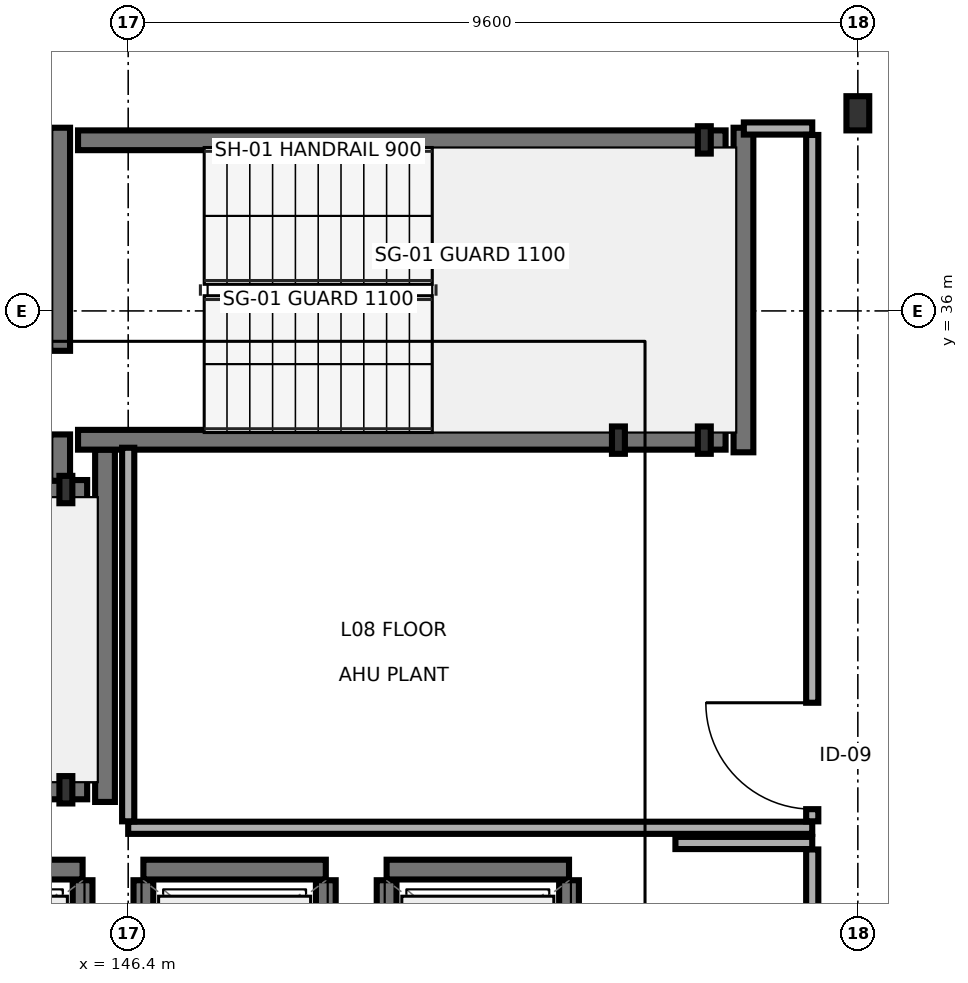
"""IFC4 building model, lengths in metres.
Left out: names, types, materials, properties, quantities, classifications, styles, units other than length and angle.
Written with IfcOpenShell. Run it as: python <this file> out.ifc"""

import sys

from ifc_helpers import new_model, si_unit, direction, frame, frame_2d, origin, origin_2d, place, context, subcontext, project, spatial, rectangle, i_section, extrude, element, fill, save


model = new_model("IFC4")
c1 = context("Model", 3, precision=1e-05, world=origin(), true_north=direction((0.0, 1.0)))
c2 = subcontext(c1, "Body", "Model", "MODEL_VIEW")
j1 = project(units=[si_unit("LENGTHUNIT", "METRE"), si_unit("PLANEANGLEUNIT", "RADIAN")], contexts=[c1])
p1 = place(None, origin())
s1 = spatial("IfcSite", under=j1, at=p1, CompositionType="ELEMENT")
p2 = place(p1, origin())
s2 = spatial("IfcBuilding", under=s1, at=p2, CompositionType="ELEMENT")
p3 = place(p2, frame((0.0, 0.0, 28.3)))
s3 = spatial("IfcBuildingStorey", under=s2, at=p3, CompositionType="ELEMENT", Elevation=28.3)
for number, where, z_axis, x_axis in (
    (1, (145.58, 29.7, 0.0), (0.0, 0.0, 1.0), (1.0, 0.0, 0.0)),
    (2, (145.58, 33.65, 0.0), (0.0, 0.0, 1.0), (1.0, 0.0, 0.0)),
    (3, (152.85, 34.3, 0.0), (0.0, 0.0, 1.0), (1.0, 0.0, 0.0)),
    (4, (153.98, 34.3, 0.0), (0.0, 0.0, 1.0), (1.0, 0.0, 0.0)),
    (5, (153.98, 38.25, 0.0), (0.0, 0.0, 1.0), (1.0, 0.0, 0.0)),
):
    element("IfcColumn", number, at=place(p3, frame(where, z_axis=z_axis, x_axis=x_axis)), inside=s3, PredefinedType="PILASTER", context=c2, shape_type="SweptSolid", body=[
        extrude(i_section(OverallWidth=0.17, OverallDepth=0.36, WebThickness=0.008, FlangeThickness=0.013, FilletRadius=0.018, at=origin_2d()), origin(), (0.0, 0.0, 1.0), 3.4),
    ])
p4 = place(p3, frame((156.0, 38.6, 0.0), z_axis=(0.0, 0.0, 1.0), x_axis=(1.0, 0.0, 0.0)))
e6 = element("IfcColumn", 6, at=p4, inside=s3, PredefinedType="COLUMN", context=c2, shape_type="SweptSolid", body=[
    extrude(i_section(OverallWidth=0.3, OverallDepth=0.45, WebThickness=0.014, FlangeThickness=0.026, FilletRadius=0.027, at=origin_2d()), origin(), (0.0, 0.0, 1.0), 3.4),
])
p5 = place(p3, frame((146.095, 29.54, 0.0), z_axis=(0.0, 0.0, 1.0), x_axis=(0.0, 1.0, 0.0)))
e7 = element("IfcWall", 7, at=p5, inside=s3, PredefinedType="SHEAR", context=c2, shape_type="SweptSolid", body=[
    extrude(rectangle(XDim=4.635, YDim=0.26, at=frame_2d((2.317, 0.0))), origin(), (0.0, 0.0, 1.0), 3.175),
])
for number, where, z_axis, x_axis in (
    (8, (137.34, 29.705, 0.0), (0.0, 0.0, 1.0), (1.0, 0.0, 0.0)),
    (9, (137.34, 33.645, 0.0), (0.0, 0.0, 1.0), (1.0, 0.0, 0.0)),
):
    element("IfcWall", number, at=place(p3, frame(where, z_axis=z_axis, x_axis=x_axis)), inside=s3, PredefinedType="SHEAR", context=c2, shape_type="SweptSolid", body=[
        extrude(rectangle(XDim=8.52, YDim=0.26, at=frame_2d((4.26, 0.0))), origin(), (0.0, 0.0, 1.0), 3.175),
    ])
p6 = place(p3, frame((145.505, 33.765, 0.0), z_axis=(0.0, 0.0, 1.0), x_axis=(0.0, 1.0, 0.0)))
e10 = element("IfcWall", 10, at=p6, inside=s3, PredefinedType="SHEAR", context=c2, shape_type="SweptSolid", body=[
    extrude(rectangle(XDim=4.645, YDim=0.26, at=frame_2d((2.323, 0.0))), origin(), (0.0, 0.0, 1.0), 3.175),
])
p7 = place(p6, frame((0.61, 0.0, 0.0)))
e11 = element("IfcOpeningElement", 11, at=p7, cuts=e10, PredefinedType="OPENING", context=c2, shape_type="SweptSolid", body=[
    extrude(rectangle(XDim=1.1, YDim=2.2, at=frame_2d((0.55, 1.1))), frame((0.0, 0.14, 0.0), z_axis=(0.0, -1.0, 0.0), x_axis=(1.0, 0.0, 0.0)), (0.0, 0.0, 1.0), 0.28),
])
p8 = place(p3, frame((154.495, 34.14, 0.0), z_axis=(0.0, 0.0, 1.0), x_axis=(0.0, 1.0, 0.0)))
e12 = element("IfcWall", 12, at=p8, inside=s3, PredefinedType="SHEAR", context=c2, shape_type="SweptSolid", body=[
    extrude(rectangle(XDim=4.27, YDim=0.26, at=frame_2d((2.135, 0.0))), origin(), (0.0, 0.0, 1.0), 3.175),
])
for number, where, z_axis, x_axis in (
    (13, (145.74, 34.305, 0.0), (0.0, 0.0, 1.0), (1.0, 0.0, 0.0)),
    (14, (145.74, 38.245, 0.0), (0.0, 0.0, 1.0), (1.0, 0.0, 0.0)),
):
    element("IfcWall", number, at=place(p3, frame(where, z_axis=z_axis, x_axis=x_axis)), inside=s3, PredefinedType="SHEAR", context=c2, shape_type="SweptSolid", body=[
        extrude(rectangle(XDim=8.52, YDim=0.26, at=frame_2d((4.26, 0.0))), origin(), (0.0, 0.0, 1.0), 3.175),
    ])
p9 = place(p3, frame((143.4, 28.65, 0.0), z_axis=(0.0, 0.0, 1.0), x_axis=(1.0, 0.0, 0.0)))
e15 = element("IfcWall", 15, at=p9, inside=s3, PredefinedType="SHEAR", context=c2, shape_type="SweptSolid", body=[
    extrude(rectangle(XDim=2.4, YDim=0.26, at=frame_2d((1.2, 0.0))), origin(), (0.0, 0.0, 1.0), 3.175),
])
p10 = place(p3, frame((145.8, 26.69, 0.0), z_axis=(0.0, 0.0, 1.0), x_axis=(0.0, 1.0, 0.0)))
e16 = element("IfcWall", 16, at=p10, inside=s3, PredefinedType="SHEAR", context=c2, shape_type="SweptSolid", body=[
    extrude(rectangle(XDim=1.82, YDim=0.26, at=frame_2d((0.91, 0.0))), origin(), (0.0, 0.0, 1.0), 3.175),
])
p11 = place(p3, frame((146.6, 28.65, 0.0), z_axis=(0.0, 0.0, 1.0), x_axis=(1.0, 0.0, 0.0)))
e17 = element("IfcWall", 17, at=p11, inside=s3, PredefinedType="SHEAR", context=c2, shape_type="SweptSolid", body=[
    extrude(rectangle(XDim=2.4, YDim=0.26, at=frame_2d((1.2, 0.0))), origin(), (0.0, 0.0, 1.0), 3.175),
])
for number, where, z_axis, x_axis in (
    (18, (146.6, 26.69, 0.0), (0.0, 0.0, 1.0), (0.0, 1.0, 0.0)),
    (19, (149.0, 26.69, 0.0), (0.0, 0.0, 1.0), (0.0, 1.0, 0.0)),
):
    element("IfcWall", number, at=place(p3, frame(where, z_axis=z_axis, x_axis=x_axis)), inside=s3, PredefinedType="SHEAR", context=c2, shape_type="SweptSolid", body=[
        extrude(rectangle(XDim=1.82, YDim=0.26, at=frame_2d((0.91, 0.0))), origin(), (0.0, 0.0, 1.0), 3.175),
    ])
p12 = place(p3, frame((149.8, 28.65, 0.0), z_axis=(0.0, 0.0, 1.0), x_axis=(1.0, 0.0, 0.0)))
e20 = element("IfcWall", 20, at=p12, inside=s3, PredefinedType="SHEAR", context=c2, shape_type="SweptSolid", body=[
    extrude(rectangle(XDim=2.4, YDim=0.26, at=frame_2d((1.2, 0.0))), origin(), (0.0, 0.0, 1.0), 3.175),
])
for number, where, z_axis, x_axis in (
    (21, (149.8, 26.69, 0.0), (0.0, 0.0, 1.0), (0.0, 1.0, 0.0)),
    (22, (152.2, 26.69, 0.0), (0.0, 0.0, 1.0), (0.0, 1.0, 0.0)),
):
    element("IfcWall", number, at=place(p3, frame(where, z_axis=z_axis, x_axis=x_axis)), inside=s3, PredefinedType="SHEAR", context=c2, shape_type="SweptSolid", body=[
        extrude(rectangle(XDim=1.82, YDim=0.26, at=frame_2d((0.91, 0.0))), origin(), (0.0, 0.0, 1.0), 3.175),
    ])
p13 = place(p3, frame((146.4, 29.2, 0.0), z_axis=(0.0, 0.0, 1.0), x_axis=(1.0, 0.0, 0.0)))
e23 = element("IfcWall", 23, at=p13, inside=s3, PredefinedType="PARTITIONING", context=c2, shape_type="SweptSolid", body=[
    extrude(rectangle(XDim=9.0, YDim=0.16, at=frame_2d((4.5, 0.0))), origin(), (0.0, 0.0, 1.0), 3.175),
])
p14 = place(p3, frame((146.4, 29.285, 0.0), z_axis=(0.0, 0.0, 1.0), x_axis=(0.0, 1.0, 0.0)))
e24 = element("IfcWall", 24, at=p14, inside=s3, PredefinedType="PARTITIONING", context=c2, shape_type="SweptSolid", body=[
    extrude(rectangle(XDim=4.915, YDim=0.16, at=frame_2d((2.458, 0.0))), origin(), (0.0, 0.0, 1.0), 3.175),
])
p15 = place(p3, frame((154.5, 38.4, 0.0), z_axis=(0.0, 0.0, 1.0), x_axis=(1.0, 0.0, 0.0)))
e25 = element("IfcWall", 25, at=p15, inside=s3, PredefinedType="PARTITIONING", context=c2, shape_type="SweptSolid", body=[
    extrude(rectangle(XDim=0.9, YDim=0.16, at=frame_2d((0.45, 0.0))), origin(), (0.0, 0.0, 1.0), 2.71),
])
p16 = place(p3, frame((155.4, 29.285, 0.0), z_axis=(0.0, 0.0, 1.0), x_axis=(0.0, 1.0, 0.0)))
e26 = element("IfcWall", 26, at=p16, inside=s3, PredefinedType="PARTITIONING", context=c2, shape_type="SweptSolid", body=[
    extrude(rectangle(XDim=9.03, YDim=0.16, at=frame_2d((4.515, 0.0))), origin(), (0.0, 0.0, 1.0), 3.175),
])
p17 = place(p16, frame((0.16, 0.0, 0.0)))
e27 = element("IfcOpeningElement", 27, at=p17, cuts=e26, PredefinedType="OPENING", context=c2, shape_type="SweptSolid", body=[
    extrude(rectangle(XDim=1.4, YDim=2.2, at=frame_2d((0.7, 1.1))), frame((0.0, 0.09, 0.0), z_axis=(0.0, -1.0, 0.0), x_axis=(1.0, 0.0, 0.0)), (0.0, 0.0, 1.0), 0.18),
])
p18 = place(p3, frame((153.6, 29.0, 0.0), z_axis=(0.0, 0.0, 1.0), x_axis=(1.0, 0.0, 0.0)))
e28 = element("IfcWall", 28, at=p18, inside=s3, PredefinedType="PARTITIONING", context=c2, shape_type="SweptSolid", body=[
    extrude(rectangle(XDim=1.8, YDim=0.16, at=frame_2d((0.9, 0.0))), origin(), (0.0, 0.0, 1.0), 3.175),
])
p19 = place(p3, frame((155.4, 16.885, 0.0), z_axis=(0.0, 0.0, 1.0), x_axis=(0.0, 1.0, 0.0)))
e29 = element("IfcWall", 29, at=p19, inside=s3, PredefinedType="PARTITIONING", context=c2, shape_type="SweptSolid", body=[
    extrude(rectangle(XDim=12.03, YDim=0.16, at=frame_2d((6.015, 0.0))), origin(), (0.0, 0.0, 1.0), 2.71),
])
p20 = place(p19, frame((5.365, 0.0, 0.0)))
e30 = element("IfcOpeningElement", 30, at=p20, cuts=e29, PredefinedType="OPENING", context=c2, shape_type="SweptSolid", body=[
    extrude(rectangle(XDim=1.3, YDim=2.2, at=frame_2d((0.65, 1.1))), frame((0.0, 0.09, 0.0), z_axis=(0.0, -1.0, 0.0), x_axis=(1.0, 0.0, 0.0)), (0.0, 0.0, 1.0), 0.18),
])
p21 = place(p7, origin())
e31 = element("IfcDoor", 31, at=p21, inside=s3, OperationType="SINGLE_SWING_LEFT", PredefinedType="DOOR", context=c2, shape_type="SweptSolid", body=[
    extrude(rectangle(XDim=1.1, YDim=2.2, at=frame_2d((0.55, 1.1))), frame((0.0, 0.025, 0.0), z_axis=(0.0, -1.0, 0.0), x_axis=(1.0, 0.0, 0.0)), (0.0, 0.0, 1.0), 0.05),
])
fill(e11, e31)
p22 = place(p17, origin())
e32 = element("IfcDoor", 32, at=p22, inside=s3, OperationType="SINGLE_SWING_RIGHT", PredefinedType="DOOR", context=c2, shape_type="SweptSolid", body=[
    extrude(rectangle(XDim=1.4, YDim=2.2, at=frame_2d((0.7, 1.1))), frame((0.0, 0.025, 0.0), z_axis=(0.0, -1.0, 0.0), x_axis=(1.0, 0.0, 0.0)), (0.0, 0.0, 1.0), 0.05),
])
fill(e27, e32)
save(model, sys.argv[1])
